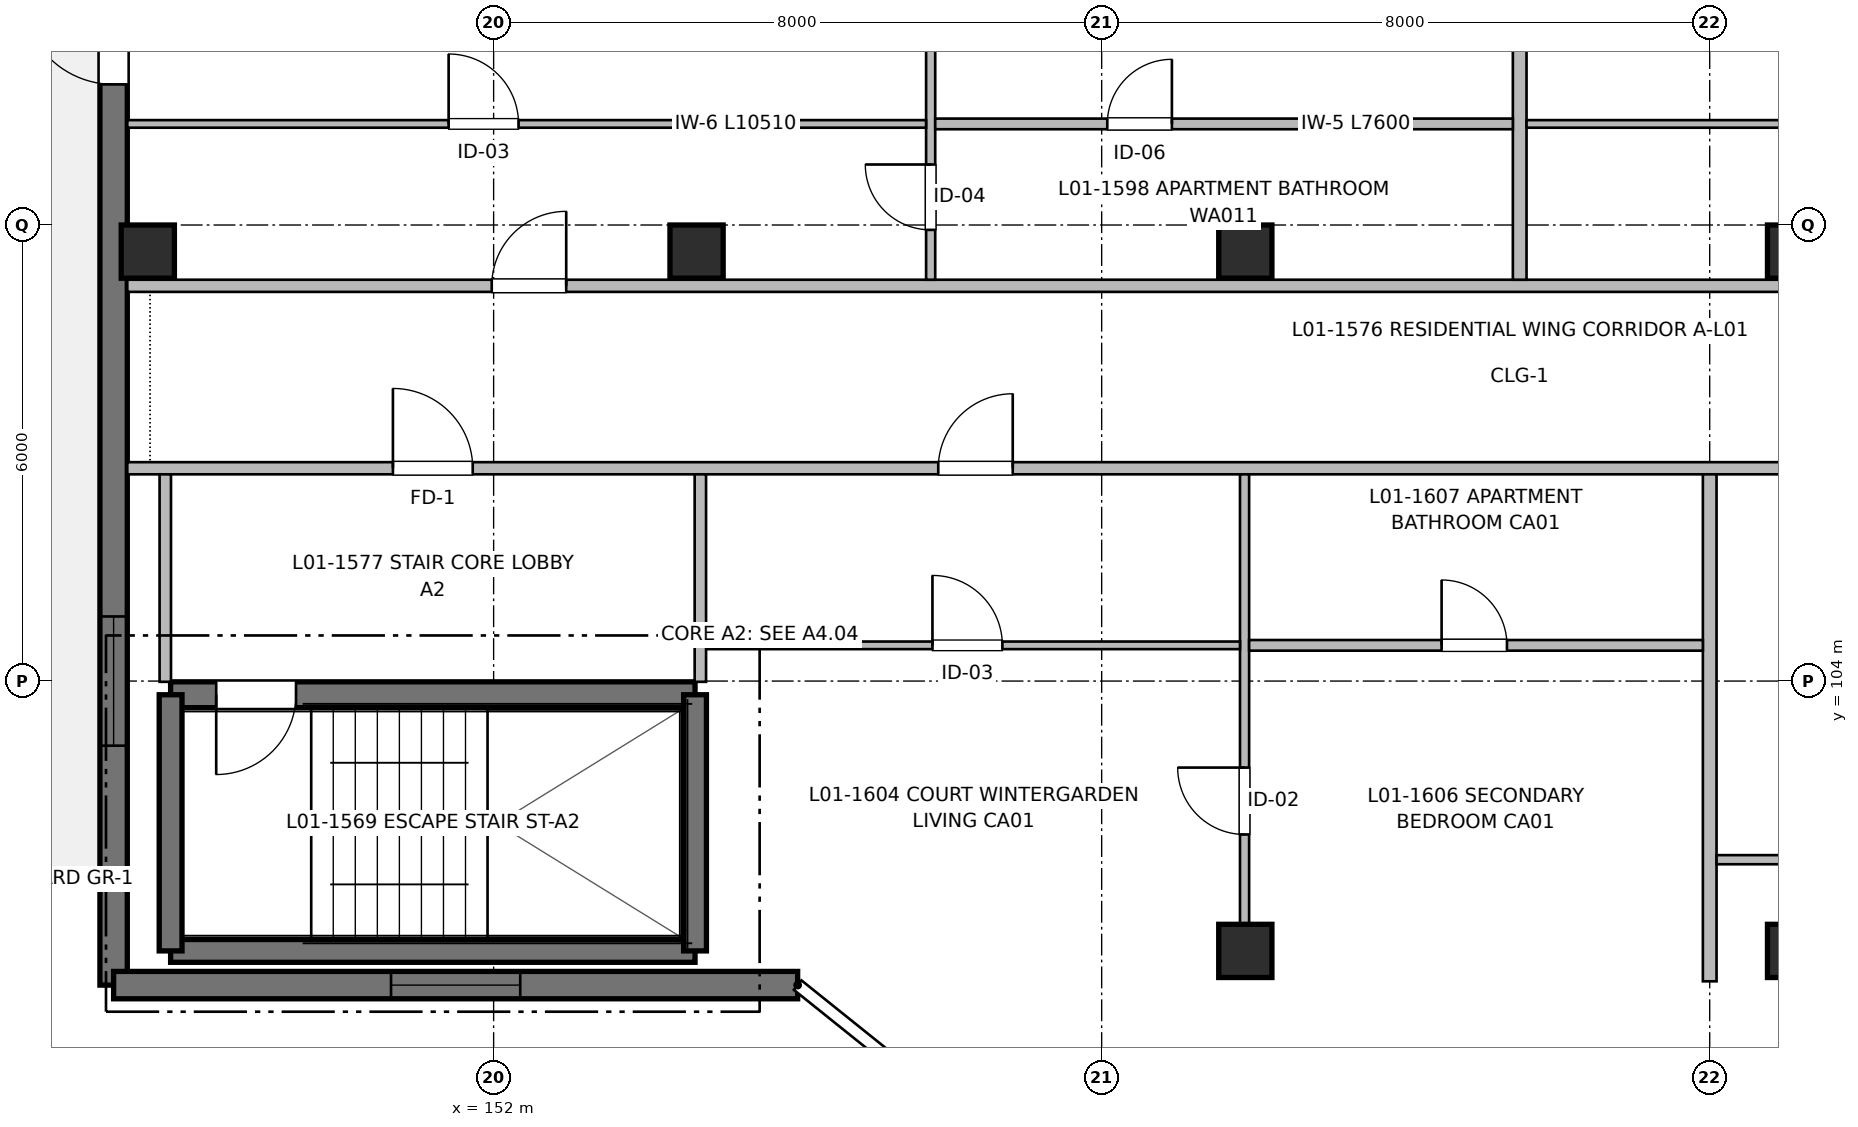
"""IFC4 building model, lengths in metres.
Left out: names, types, materials, properties, quantities, classifications, styles, units other than length and angle.
Written with IfcOpenShell. Run it as: python <this file> out.ifc"""

import sys

from ifc_helpers import new_model, si_unit, direction, frame, frame_2d, origin, origin_2d, place, context, subcontext, project, spatial, rectangle, extrude, element, fill, save


model = new_model("IFC4")
c1 = context("Model", 3, precision=1e-05, world=origin(), true_north=direction((0.0, 1.0)))
c2 = subcontext(c1, "Body", "Model", "MODEL_VIEW")
j1 = project(units=[si_unit("LENGTHUNIT", "METRE"), si_unit("PLANEANGLEUNIT", "RADIAN")], contexts=[c1])
p1 = place(None, origin())
s1 = spatial("IfcSite", under=j1, at=p1, CompositionType="ELEMENT")
p2 = place(p1, origin())
s2 = spatial("IfcBuilding", under=s1, at=p2, CompositionType="ELEMENT")
p3 = place(p2, frame((0.0, 0.0, 4.16)))
s3 = spatial("IfcBuildingStorey", under=s2, at=p3, CompositionType="ELEMENT", Elevation=4.16)
for number, where, z_axis, x_axis in (
    (1, (147.45, 109.65, 0.0), (0.0, 0.0, 1.0), (1.0, 0.0, 0.0)),
    (2, (154.67, 109.65, 0.0), (0.0, 0.0, 1.0), (1.0, 0.0, 0.0)),
    (3, (161.89, 100.45, 0.0), (0.0, 0.0, 1.0), (1.0, 0.0, 0.0)),
    (4, (161.89, 109.65, 0.0), (0.0, 0.0, 1.0), (1.0, 0.0, 0.0)),
    (5, (169.11, 100.45, 0.0), (0.0, 0.0, 1.0), (1.0, 0.0, 0.0)),
    (6, (169.11, 109.65, 0.0), (0.0, 0.0, 1.0), (1.0, 0.0, 0.0)),
):
    element("IfcColumn", number, at=place(p3, frame(where, z_axis=z_axis, x_axis=x_axis)), inside=s3, PredefinedType="COLUMN", context=c2, shape_type="SweptSolid", body=[
        extrude(rectangle(XDim=0.7, YDim=0.7, at=origin_2d()), origin(), (0.0, 0.0, 1.0), 3.2),
    ])
p4 = place(p3, frame((147.75, 100.45, 0.0), z_axis=(0.0, 0.0, 1.0), x_axis=(1.0, 0.0, 0.0)))
e7 = element("IfcWall", 7, at=p4, inside=s3, PredefinedType="SHEAR", context=c2, shape_type="SweptSolid", body=[
    extrude(rectangle(XDim=6.9, YDim=0.3, at=frame_2d((3.45, 0.0))), origin(), (0.0, 0.0, 1.0), 3.2),
])
p5 = place(p3, frame((154.65, 103.82, 0.0), z_axis=(0.0, 0.0, 1.0), x_axis=(-1.0, 0.0, 0.0)))
e8 = element("IfcWall", 8, at=p5, inside=s3, PredefinedType="SHEAR", context=c2, shape_type="SweptSolid", body=[
    extrude(rectangle(XDim=6.9, YDim=0.34, at=frame_2d((3.45, 0.0))), origin(), (0.0, 0.0, 1.0), 3.2),
])
p6 = place(p5, frame((5.25, 0.0, 0.0)))
e9 = element("IfcOpeningElement", 9, at=p6, cuts=e8, PredefinedType="OPENING", context=c2, shape_type="SweptSolid", body=[
    extrude(rectangle(XDim=1.05, YDim=2.15, at=frame_2d((0.525, 1.075))), frame((0.0, 0.18, 0.0), z_axis=(0.0, -1.0, 0.0), x_axis=(1.0, 0.0, 0.0)), (0.0, 0.0, 1.0), 0.36),
])
for number, where, z_axis, x_axis in (
    (10, (147.75, 103.82, 0.0), (0.0, 0.0, 1.0), (0.0, -1.0, 0.0)),
    (11, (154.65, 100.45, 0.0), (0.0, 0.0, 1.0), (0.0, 1.0, 0.0)),
):
    element("IfcWall", number, at=place(p3, frame(where, z_axis=z_axis, x_axis=x_axis)), inside=s3, PredefinedType="SHEAR", context=c2, shape_type="SweptSolid", body=[
        extrude(rectangle(XDim=3.37, YDim=0.3, at=frame_2d((1.685, 0.0))), origin(), (0.0, 0.0, 1.0), 3.2),
    ])
p7 = place(p3, frame((147.0, 100.0, 0.0), z_axis=(0.0, 0.0, 1.0), x_axis=(0.0, 1.0, 0.0)))
e12 = element("IfcWall", 12, at=p7, inside=s3, PredefinedType="SHEAR", context=c2, shape_type="SweptSolid", body=[
    extrude(rectangle(XDim=16.0, YDim=0.36, at=frame_2d((8.0, 0.0))), origin(), (0.0, 0.0, 1.0), 2.98),
])
p8 = place(p7, frame((3.15, 0.0, 0.72)))
e13 = element("IfcOpeningElement", 13, at=p8, cuts=e12, PredefinedType="OPENING", context=c2, shape_type="SweptSolid", body=[
    extrude(rectangle(XDim=1.7, YDim=1.5, at=frame_2d((0.85, 0.75))), frame((0.0, 0.19, 0.0), z_axis=(0.0, -1.0, 0.0), x_axis=(1.0, 0.0, 0.0)), (0.0, 0.0, 1.0), 0.38),
])
p9 = place(p7, frame((11.85, 0.0, 0.0)))
e14 = element("IfcOpeningElement", 14, at=p9, cuts=e12, PredefinedType="OPENING", context=c2, shape_type="SweptSolid", body=[
    extrude(rectangle(XDim=1.2, YDim=2.2, at=frame_2d((0.6, 1.1))), frame((0.0, 0.19, 0.0), z_axis=(0.0, -1.0, 0.0), x_axis=(1.0, 0.0, 0.0)), (0.0, 0.0, 1.0), 0.38),
])
p10 = place(p3, frame((156.0, 100.0, 0.0), z_axis=(0.0, 0.0, 1.0), x_axis=(-1.0, 0.0, 0.0)))
e15 = element("IfcWall", 15, at=p10, inside=s3, PredefinedType="SHEAR", context=c2, shape_type="SweptSolid", body=[
    extrude(rectangle(XDim=9.0, YDim=0.36, at=frame_2d((4.5, 0.0))), origin(), (0.0, 0.0, 1.0), 2.98),
])
p11 = place(p10, frame((3.65, 0.0, 0.72)))
e16 = element("IfcOpeningElement", 16, at=p11, cuts=e15, PredefinedType="OPENING", context=c2, shape_type="SweptSolid", body=[
    extrude(rectangle(XDim=1.7, YDim=1.5, at=frame_2d((0.85, 0.75))), frame((0.0, 0.19, 0.0), z_axis=(0.0, -1.0, 0.0), x_axis=(1.0, 0.0, 0.0)), (0.0, 0.0, 1.0), 0.38),
])
p12 = place(p3, frame((147.18, 106.8, 0.0), z_axis=(0.0, 0.0, 1.0), x_axis=(1.0, 0.0, 0.0)))
e17 = element("IfcWall", 17, at=p12, inside=s3, PredefinedType="PARTITIONING", context=c2, shape_type="SweptSolid", body=[
    extrude(rectangle(XDim=27.62, YDim=0.16, at=frame_2d((13.81, 0.0))), origin(), (0.0, 0.0, 1.0), 2.935),
])
p13 = place(p12, frame((3.495, 0.0, 0.0)))
e18 = element("IfcOpeningElement", 18, at=p13, cuts=e17, PredefinedType="OPENING", context=c2, shape_type="SweptSolid", body=[
    extrude(rectangle(XDim=1.05, YDim=2.15, at=frame_2d((0.525, 1.075))), frame((0.0, 0.09, 0.0), z_axis=(0.0, -1.0, 0.0), x_axis=(1.0, 0.0, 0.0)), (0.0, 0.0, 1.0), 0.18),
])
p14 = place(p12, frame((10.67, 0.0, 0.0)))
e19 = element("IfcOpeningElement", 19, at=p14, cuts=e17, PredefinedType="OPENING", context=c2, shape_type="SweptSolid", body=[
    extrude(rectangle(XDim=0.98, YDim=2.15, at=frame_2d((0.49, 1.075))), frame((0.0, 0.09, 0.0), z_axis=(0.0, -1.0, 0.0), x_axis=(1.0, 0.0, 0.0)), (0.0, 0.0, 1.0), 0.18),
])
p15 = place(p3, frame((147.18, 109.2, 0.0), z_axis=(0.0, 0.0, 1.0), x_axis=(1.0, 0.0, 0.0)))
e20 = element("IfcWall", 20, at=p15, inside=s3, PredefinedType="PARTITIONING", context=c2, shape_type="SweptSolid", body=[
    extrude(rectangle(XDim=36.64, YDim=0.16, at=frame_2d((18.32, 0.0))), origin(), (0.0, 0.0, 1.0), 2.935),
])
p16 = place(p15, frame((4.795, 0.0, 0.0)))
e21 = element("IfcOpeningElement", 21, at=p16, cuts=e20, PredefinedType="OPENING", context=c2, shape_type="SweptSolid", body=[
    extrude(rectangle(XDim=0.98, YDim=2.15, at=frame_2d((0.49, 1.075))), frame((0.0, 0.09, 0.0), z_axis=(0.0, -1.0, 0.0), x_axis=(1.0, 0.0, 0.0)), (0.0, 0.0, 1.0), 0.18),
])
p17 = place(p15, frame((23.205, 0.0, 0.0)))
e22 = element("IfcOpeningElement", 22, at=p17, cuts=e20, PredefinedType="OPENING", context=c2, shape_type="SweptSolid", body=[
    extrude(rectangle(XDim=0.98, YDim=2.15, at=frame_2d((0.49, 1.075))), frame((0.0, 0.09, 0.0), z_axis=(0.0, -1.0, 0.0), x_axis=(1.0, 0.0, 0.0)), (0.0, 0.0, 1.0), 0.18),
])
p18 = place(p3, frame((168.0, 100.05, 0.0), z_axis=(0.0, 0.0, 1.0), x_axis=(0.0, 1.0, 0.0)))
e23 = element("IfcWall", 23, at=p18, inside=s3, PredefinedType="PARTITIONING", context=c2, shape_type="SweptSolid", body=[
    extrude(rectangle(XDim=6.67, YDim=0.18, at=frame_2d((3.335, 0.0))), origin(), (0.0, 0.0, 1.0), 2.935),
])
for number, where, z_axis, x_axis in (
    (24, (147.68, 103.99, 0.0), (0.0, 0.0, 1.0), (0.0, 1.0, 0.0)),
    (25, (154.72, 103.99, 0.0), (0.0, 0.0, 1.0), (0.0, 1.0, 0.0)),
):
    element("IfcWall", number, at=place(p3, frame(where, z_axis=z_axis, x_axis=x_axis)), inside=s3, PredefinedType="PARTITIONING", context=c2, shape_type="SweptSolid", body=[
        extrude(rectangle(XDim=2.73, YDim=0.15, at=frame_2d((1.365, 0.0))), origin(), (0.0, 0.0, 1.0), 2.935),
    ])
p19 = place(p3, frame((168.09, 101.65, 0.0), z_axis=(0.0, 0.0, 1.0), x_axis=(1.0, 0.0, 0.0)))
e26 = element("IfcWall", 26, at=p19, inside=s3, PredefinedType="PARTITIONING", context=c2, shape_type="SweptSolid", body=[
    extrude(rectangle(XDim=4.19, YDim=0.12, at=frame_2d((2.095, 0.0))), origin(), (0.0, 0.0, 1.0), 2.935),
])
p20 = place(p19, frame((2.045, 0.0, 0.0)))
e27 = element("IfcOpeningElement", 27, at=p20, cuts=e26, PredefinedType="OPENING", context=c2, shape_type="SweptSolid", body=[
    extrude(rectangle(XDim=0.9, YDim=2.1, at=frame_2d((0.45, 1.05))), frame((0.0, 0.07, 0.0), z_axis=(0.0, -1.0, 0.0), x_axis=(1.0, 0.0, 0.0)), (0.0, 0.0, 1.0), 0.14),
])
p21 = place(p3, frame((165.5, 109.28, 0.0), z_axis=(0.0, 0.0, 1.0), x_axis=(0.0, 1.0, 0.0)))
e28 = element("IfcWall", 28, at=p21, inside=s3, PredefinedType="PARTITIONING", context=c2, shape_type="SweptSolid", body=[
    extrude(rectangle(XDim=6.59, YDim=0.18, at=frame_2d((3.295, 0.0))), origin(), (0.0, 0.0, 1.0), 2.67),
])
p22 = place(p3, frame((157.75, 109.28, 0.0), z_axis=(0.0, 0.0, 1.0), x_axis=(0.0, 1.0, 0.0)))
e29 = element("IfcWall", 29, at=p22, inside=s3, PredefinedType="PARTITIONING", context=c2, shape_type="SweptSolid", body=[
    extrude(rectangle(XDim=6.59, YDim=0.12, at=frame_2d((3.295, 0.0))), origin(), (0.0, 0.0, 1.0), 2.935),
])
p23 = place(p22, frame((0.656, 0.0, 0.0)))
e30 = element("IfcOpeningElement", 30, at=p23, cuts=e29, PredefinedType="OPENING", context=c2, shape_type="SweptSolid", body=[
    extrude(rectangle(XDim=0.86, YDim=2.1, at=frame_2d((0.43, 1.05))), frame((0.0, 0.07, 0.0), z_axis=(0.0, -1.0, 0.0), x_axis=(1.0, 0.0, 0.0)), (0.0, 0.0, 1.0), 0.14),
])
p24 = place(p22, frame((4.093, 0.0, 0.0)))
e31 = element("IfcOpeningElement", 31, at=p24, cuts=e29, PredefinedType="OPENING", context=c2, shape_type="SweptSolid", body=[
    extrude(rectangle(XDim=0.9, YDim=2.1, at=frame_2d((0.45, 1.05))), frame((0.0, 0.07, 0.0), z_axis=(0.0, -1.0, 0.0), x_axis=(1.0, 0.0, 0.0)), (0.0, 0.0, 1.0), 0.14),
])
p25 = place(p3, frame((157.81, 111.33, 0.0), z_axis=(0.0, 0.0, 1.0), x_axis=(1.0, 0.0, 0.0)))
e32 = element("IfcWall", 32, at=p25, inside=s3, PredefinedType="PARTITIONING", context=c2, shape_type="SweptSolid", body=[
    extrude(rectangle(XDim=7.6, YDim=0.14, at=frame_2d((3.8, 0.0))), origin(), (0.0, 0.0, 1.0), 2.935),
])
p26 = place(p25, frame((2.264, 0.0, 0.0)))
e33 = element("IfcOpeningElement", 33, at=p26, cuts=e32, PredefinedType="OPENING", context=c2, shape_type="SweptSolid", body=[
    extrude(rectangle(XDim=0.85, YDim=2.05, at=frame_2d((0.425, 1.025))), frame((0.0, 0.08, 0.0), z_axis=(0.0, -1.0, 0.0), x_axis=(1.0, 0.0, 0.0)), (0.0, 0.0, 1.0), 0.16),
])
p27 = place(p3, frame((147.18, 111.33, 0.0), z_axis=(0.0, 0.0, 1.0), x_axis=(1.0, 0.0, 0.0)))
e34 = element("IfcWall", 34, at=p27, inside=s3, PredefinedType="PARTITIONING", context=c2, shape_type="SweptSolid", body=[
    extrude(rectangle(XDim=10.51, YDim=0.1, at=frame_2d((5.255, 0.0))), origin(), (0.0, 0.0, 1.0), 2.935),
])
p28 = place(p27, frame((4.228, 0.0, 0.0)))
e35 = element("IfcOpeningElement", 35, at=p28, cuts=e34, PredefinedType="OPENING", context=c2, shape_type="SweptSolid", body=[
    extrude(rectangle(XDim=0.92, YDim=2.1, at=frame_2d((0.46, 1.05))), frame((0.0, 0.06, 0.0), z_axis=(0.0, -1.0, 0.0), x_axis=(1.0, 0.0, 0.0)), (0.0, 0.0, 1.0), 0.12),
])
p29 = place(p3, frame((165.59, 111.33, 0.0), z_axis=(0.0, 0.0, 1.0), x_axis=(1.0, 0.0, 0.0)))
e36 = element("IfcWall", 36, at=p29, inside=s3, PredefinedType="PARTITIONING", context=c2, shape_type="SweptSolid", body=[
    extrude(rectangle(XDim=10.51, YDim=0.1, at=frame_2d((5.255, 0.0))), origin(), (0.0, 0.0, 1.0), 2.935),
])
p30 = place(p29, frame((4.228, 0.0, 0.0)))
e37 = element("IfcOpeningElement", 37, at=p30, cuts=e36, PredefinedType="OPENING", context=c2, shape_type="SweptSolid", body=[
    extrude(rectangle(XDim=0.92, YDim=2.1, at=frame_2d((0.46, 1.05))), frame((0.0, 0.06, 0.0), z_axis=(0.0, -1.0, 0.0), x_axis=(1.0, 0.0, 0.0)), (0.0, 0.0, 1.0), 0.12),
])
p31 = place(p3, frame((161.88, 100.18, 0.0), z_axis=(0.0, 0.0, 1.0), x_axis=(0.0, 1.0, 0.0)))
e38 = element("IfcWall", 38, at=p31, inside=s3, PredefinedType="PARTITIONING", context=c2, shape_type="SweptSolid", body=[
    extrude(rectangle(XDim=6.54, YDim=0.12, at=frame_2d((3.27, 0.0))), origin(), (0.0, 0.0, 1.0), 2.68),
])
p32 = place(p31, frame((1.802, 0.0, 0.0)))
e39 = element("IfcOpeningElement", 39, at=p32, cuts=e38, PredefinedType="OPENING", context=c2, shape_type="SweptSolid", body=[
    extrude(rectangle(XDim=0.88, YDim=2.1, at=frame_2d((0.44, 1.05))), frame((0.0, 0.07, 0.0), z_axis=(0.0, -1.0, 0.0), x_axis=(1.0, 0.0, 0.0)), (0.0, 0.0, 1.0), 0.14),
])
p33 = place(p3, frame((161.94, 104.47, 0.0), z_axis=(0.0, 0.0, 1.0), x_axis=(1.0, 0.0, 0.0)))
e40 = element("IfcWall", 40, at=p33, inside=s3, PredefinedType="PARTITIONING", context=c2, shape_type="SweptSolid", body=[
    extrude(rectangle(XDim=5.97, YDim=0.14, at=frame_2d((2.985, 0.0))), origin(), (0.0, 0.0, 1.0), 2.935),
])
p34 = place(p33, frame((2.533, 0.0, 0.0)))
e41 = element("IfcOpeningElement", 41, at=p34, cuts=e40, PredefinedType="OPENING", context=c2, shape_type="SweptSolid", body=[
    extrude(rectangle(XDim=0.86, YDim=2.1, at=frame_2d((0.43, 1.05))), frame((0.0, 0.08, 0.0), z_axis=(0.0, -1.0, 0.0), x_axis=(1.0, 0.0, 0.0)), (0.0, 0.0, 1.0), 0.16),
])
p35 = place(p3, frame((154.8, 104.47, 0.0), z_axis=(0.0, 0.0, 1.0), x_axis=(1.0, 0.0, 0.0)))
e42 = element("IfcWall", 42, at=p35, inside=s3, PredefinedType="PARTITIONING", context=c2, shape_type="SweptSolid", body=[
    extrude(rectangle(XDim=7.02, YDim=0.1, at=frame_2d((3.51, 0.0))), origin(), (0.0, 0.0, 1.0), 2.935),
])
p36 = place(p35, frame((2.974, 0.0, 0.0)))
e43 = element("IfcOpeningElement", 43, at=p36, cuts=e42, PredefinedType="OPENING", context=c2, shape_type="SweptSolid", body=[
    extrude(rectangle(XDim=0.92, YDim=2.1, at=frame_2d((0.46, 1.05))), frame((0.0, 0.06, 0.0), z_axis=(0.0, -1.0, 0.0), x_axis=(1.0, 0.0, 0.0)), (0.0, 0.0, 1.0), 0.12),
])
p37 = place(p6, origin())
e44 = element("IfcDoor", 44, at=p37, inside=s3, OperationType="SINGLE_SWING_RIGHT", PredefinedType="DOOR", context=c2, shape_type="SweptSolid", body=[
    extrude(rectangle(XDim=1.05, YDim=2.15, at=frame_2d((0.525, 1.075))), frame((0.0, 0.025, 0.0), z_axis=(0.0, -1.0, 0.0), x_axis=(1.0, 0.0, 0.0)), (0.0, 0.0, 1.0), 0.05),
])
fill(e9, e44)
p38 = place(p8, origin())
e45 = element("IfcWindow", 45, at=p38, inside=s3, PartitioningType="SINGLE_PANEL", PredefinedType="WINDOW", context=c2, shape_type="SweptSolid", body=[
    extrude(rectangle(XDim=1.7, YDim=1.5, at=frame_2d((0.85, 0.75))), frame((0.0, 0.03, 0.0), z_axis=(0.0, -1.0, 0.0), x_axis=(1.0, 0.0, 0.0)), (0.0, 0.0, 1.0), 0.06),
])
fill(e13, e45)
p39 = place(p9, origin())
e46 = element("IfcDoor", 46, at=p39, inside=s3, OperationType="SINGLE_SWING_RIGHT", PredefinedType="DOOR", context=c2, shape_type="SweptSolid", body=[
    extrude(rectangle(XDim=1.2, YDim=2.2, at=frame_2d((0.6, 1.1))), frame((0.0, 0.025, 0.0), z_axis=(0.0, -1.0, 0.0), x_axis=(1.0, 0.0, 0.0)), (0.0, 0.0, 1.0), 0.05),
])
fill(e14, e46)
p40 = place(p11, origin())
e47 = element("IfcWindow", 47, at=p40, inside=s3, PartitioningType="SINGLE_PANEL", PredefinedType="WINDOW", context=c2, shape_type="SweptSolid", body=[
    extrude(rectangle(XDim=1.7, YDim=1.5, at=frame_2d((0.85, 0.75))), frame((0.0, 0.03, 0.0), z_axis=(0.0, -1.0, 0.0), x_axis=(1.0, 0.0, 0.0)), (0.0, 0.0, 1.0), 0.06),
])
fill(e16, e47)
p41 = place(p13, origin())
e48 = element("IfcDoor", 48, at=p41, inside=s3, OperationType="SINGLE_SWING_LEFT", PredefinedType="DOOR", context=c2, shape_type="SweptSolid", body=[
    extrude(rectangle(XDim=1.05, YDim=2.15, at=frame_2d((0.525, 1.075))), frame((0.0, 0.025, 0.0), z_axis=(0.0, -1.0, 0.0), x_axis=(1.0, 0.0, 0.0)), (0.0, 0.0, 1.0), 0.05),
])
fill(e18, e48)
p42 = place(p16, origin())
e49 = element("IfcDoor", 49, at=p42, inside=s3, OperationType="SINGLE_SWING_RIGHT", PredefinedType="DOOR", context=c2, shape_type="SweptSolid", body=[
    extrude(rectangle(XDim=0.98, YDim=2.15, at=frame_2d((0.49, 1.075))), frame((0.0, 0.025, 0.0), z_axis=(0.0, -1.0, 0.0), x_axis=(1.0, 0.0, 0.0)), (0.0, 0.0, 1.0), 0.05),
])
fill(e21, e49)
p43 = place(p28, origin())
e50 = element("IfcDoor", 50, at=p43, inside=s3, OperationType="SINGLE_SWING_LEFT", PredefinedType="DOOR", context=c2, shape_type="SweptSolid", body=[
    extrude(rectangle(XDim=0.92, YDim=2.1, at=frame_2d((0.46, 1.05))), frame((0.0, 0.025, 0.0), z_axis=(0.0, -1.0, 0.0), x_axis=(1.0, 0.0, 0.0)), (0.0, 0.0, 1.0), 0.05),
])
fill(e35, e50)
p44 = place(p23, origin())
e51 = element("IfcDoor", 51, at=p44, inside=s3, OperationType="SINGLE_SWING_RIGHT", PredefinedType="DOOR", context=c2, shape_type="SweptSolid", body=[
    extrude(rectangle(XDim=0.86, YDim=2.1, at=frame_2d((0.43, 1.05))), frame((0.0, 0.025, 0.0), z_axis=(0.0, -1.0, 0.0), x_axis=(1.0, 0.0, 0.0)), (0.0, 0.0, 1.0), 0.05),
])
fill(e30, e51)
p45 = place(p26, origin())
e52 = element("IfcDoor", 52, at=p45, inside=s3, OperationType="SINGLE_SWING_RIGHT", PredefinedType="DOOR", context=c2, shape_type="SweptSolid", body=[
    extrude(rectangle(XDim=0.85, YDim=2.05, at=frame_2d((0.425, 1.025))), frame((0.0, 0.025, 0.0), z_axis=(0.0, -1.0, 0.0), x_axis=(1.0, 0.0, 0.0)), (0.0, 0.0, 1.0), 0.05),
])
fill(e33, e52)
p46 = place(p14, origin())
e53 = element("IfcDoor", 53, at=p46, inside=s3, OperationType="SINGLE_SWING_RIGHT", PredefinedType="DOOR", context=c2, shape_type="SweptSolid", body=[
    extrude(rectangle(XDim=0.98, YDim=2.15, at=frame_2d((0.49, 1.075))), frame((0.0, 0.025, 0.0), z_axis=(0.0, -1.0, 0.0), x_axis=(1.0, 0.0, 0.0)), (0.0, 0.0, 1.0), 0.05),
])
fill(e19, e53)
p47 = place(p36, origin())
e54 = element("IfcDoor", 54, at=p47, inside=s3, OperationType="SINGLE_SWING_LEFT", PredefinedType="DOOR", context=c2, shape_type="SweptSolid", body=[
    extrude(rectangle(XDim=0.92, YDim=2.1, at=frame_2d((0.46, 1.05))), frame((0.0, 0.025, 0.0), z_axis=(0.0, -1.0, 0.0), x_axis=(1.0, 0.0, 0.0)), (0.0, 0.0, 1.0), 0.05),
])
fill(e43, e54)
p48 = place(p32, origin())
e55 = element("IfcDoor", 55, at=p48, inside=s3, OperationType="SINGLE_SWING_RIGHT", PredefinedType="DOOR", context=c2, shape_type="SweptSolid", body=[
    extrude(rectangle(XDim=0.88, YDim=2.1, at=frame_2d((0.44, 1.05))), frame((0.0, 0.025, 0.0), z_axis=(0.0, -1.0, 0.0), x_axis=(1.0, 0.0, 0.0)), (0.0, 0.0, 1.0), 0.05),
])
fill(e39, e55)
p49 = place(p34, origin())
e56 = element("IfcDoor", 56, at=p49, inside=s3, OperationType="SINGLE_SWING_LEFT", PredefinedType="DOOR", context=c2, shape_type="SweptSolid", body=[
    extrude(rectangle(XDim=0.86, YDim=2.1, at=frame_2d((0.43, 1.05))), frame((0.0, 0.025, 0.0), z_axis=(0.0, -1.0, 0.0), x_axis=(1.0, 0.0, 0.0)), (0.0, 0.0, 1.0), 0.05),
])
fill(e41, e56)
save(model, sys.argv[1])
